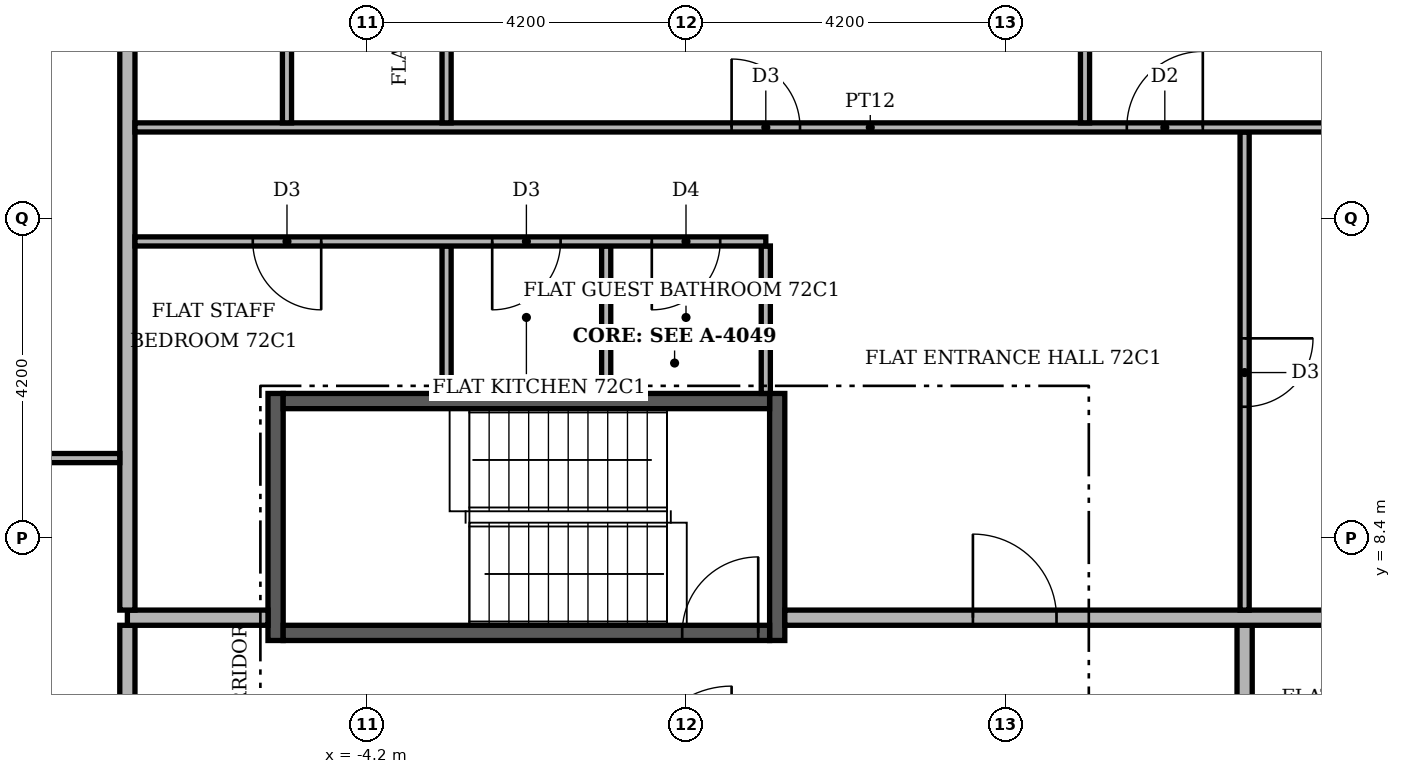
"""IFC4 building model, lengths in metres.
Left out: names, types, materials, properties, quantities, classifications, styles, units other than length and angle.
Written with IfcOpenShell. Run it as: python <this file> out.ifc"""

import sys

from ifc_helpers import new_model, si_unit, direction, frame, frame_2d, origin, place, context, subcontext, project, spatial, rectangle, extrude, element, fill, save


model = new_model("IFC4")
c1 = context("Model", 3, precision=1e-05, world=origin(), true_north=direction((0.0, 1.0)))
c2 = subcontext(c1, "Body", "Model", "MODEL_VIEW")
j1 = project(units=[si_unit("LENGTHUNIT", "METRE"), si_unit("PLANEANGLEUNIT", "RADIAN")], contexts=[c1])
p1 = place(None, origin())
s1 = spatial("IfcSite", under=j1, at=p1, CompositionType="ELEMENT")
p2 = place(p1, origin())
s2 = spatial("IfcBuilding", under=s1, at=p2, CompositionType="ELEMENT")
p3 = place(p2, frame((0.0, 0.0, 300.6)))
s3 = spatial("IfcBuildingStorey", under=s2, at=p3, CompositionType="ELEMENT", Elevation=300.6)
for number, where, z_axis, x_axis in (
    (1, (-5.4, 7.05, 0.0), (0.0, 0.0, 1.0), (0.0, 1.0, 0.0)),
    (2, (1.2, 7.05, 0.0), (0.0, 0.0, 1.0), (0.0, 1.0, 0.0)),
):
    element("IfcWall", number, at=place(p3, frame(where, z_axis=z_axis, x_axis=x_axis)), inside=s3, PredefinedType="SHEAR", context=c2, shape_type="SweptSolid", body=[
        extrude(rectangle(XDim=3.25, YDim=0.2, at=frame_2d((1.625, 0.0))), origin(), (0.0, 0.0, 1.0), 3.55),
    ])
p4 = place(p3, frame((-5.3, 7.15, 0.0), z_axis=(0.0, 0.0, 1.0), x_axis=(1.0, 0.0, 0.0)))
e3 = element("IfcWall", 3, at=p4, inside=s3, PredefinedType="SHEAR", context=c2, shape_type="SweptSolid", body=[
    extrude(rectangle(XDim=6.4, YDim=0.2, at=frame_2d((3.2, 0.0))), origin(), (0.0, 0.0, 1.0), 3.55),
])
p5 = place(p4, frame((5.25, 0.0, 0.0)))
e4 = element("IfcOpeningElement", 4, at=p5, cuts=e3, PredefinedType="OPENING", context=c2, shape_type="SweptSolid", body=[
    extrude(rectangle(XDim=1.0, YDim=2.1, at=frame_2d((0.5, 1.05))), frame((0.0, 0.11, 0.0), z_axis=(0.0, -1.0, 0.0), x_axis=(1.0, 0.0, 0.0)), (0.0, 0.0, 1.0), 0.22),
])
p6 = place(p3, frame((-5.3, 10.2, 0.0), z_axis=(0.0, 0.0, 1.0), x_axis=(1.0, 0.0, 0.0)))
e5 = element("IfcWall", 5, at=p6, inside=s3, PredefinedType="SHEAR", context=c2, shape_type="SweptSolid", body=[
    extrude(rectangle(XDim=6.4, YDim=0.2, at=frame_2d((3.2, 0.0))), origin(), (0.0, 0.0, 1.0), 3.55),
])
p7 = place(p3, frame((-7.35, -7.25, 0.0), z_axis=(0.0, 0.0, 1.0), x_axis=(0.0, 1.0, 0.0)))
e6 = element("IfcWall", 6, at=p7, inside=s3, PredefinedType="PARTITIONING", context=c2, shape_type="SweptSolid", body=[
    extrude(rectangle(XDim=14.5, YDim=0.2, at=frame_2d((7.25, 0.0))), origin(), (0.0, 0.0, 1.0), 3.55),
])
p8 = place(p7, frame((11.95, 0.0, 0.0)))
e7 = element("IfcOpeningElement", 7, at=p8, cuts=e6, PredefinedType="OPENING", context=c2, shape_type="SweptSolid", body=[
    extrude(rectangle(XDim=1.1, YDim=2.4, at=frame_2d((0.55, 1.2))), frame((0.0, 0.11, 0.0), z_axis=(0.0, -1.0, 0.0), x_axis=(1.0, 0.0, 0.0)), (0.0, 0.0, 1.0), 0.22),
])
p9 = place(p3, frame((7.35, -7.25, 0.0), z_axis=(0.0, 0.0, 1.0), x_axis=(0.0, 1.0, 0.0)))
e8 = element("IfcWall", 8, at=p9, inside=s3, PredefinedType="PARTITIONING", context=c2, shape_type="SweptSolid", body=[
    extrude(rectangle(XDim=14.5, YDim=0.2, at=frame_2d((7.25, 0.0))), origin(), (0.0, 0.0, 1.0), 3.55),
])
p10 = place(p9, frame((2.5, 0.0, 0.0)))
e9 = element("IfcOpeningElement", 9, at=p10, cuts=e8, PredefinedType="OPENING", context=c2, shape_type="SweptSolid", body=[
    extrude(rectangle(XDim=1.1, YDim=2.4, at=frame_2d((0.55, 1.2))), frame((0.0, 0.11, 0.0), z_axis=(0.0, -1.0, 0.0), x_axis=(1.0, 0.0, 0.0)), (0.0, 0.0, 1.0), 0.22),
])
p11 = place(p3, frame((-7.35, 7.35, 0.0), z_axis=(0.0, 0.0, 1.0), x_axis=(1.0, 0.0, 0.0)))
e10 = element("IfcWall", 10, at=p11, inside=s3, PredefinedType="PARTITIONING", context=c2, shape_type="SweptSolid", body=[
    extrude(rectangle(XDim=1.85, YDim=0.2, at=frame_2d((0.925, 0.0))), origin(), (0.0, 0.0, 1.0), 3.55),
])
p12 = place(p3, frame((1.3, 7.35, 0.0), z_axis=(0.0, 0.0, 1.0), x_axis=(1.0, 0.0, 0.0)))
e11 = element("IfcWall", 11, at=p12, inside=s3, PredefinedType="PARTITIONING", context=c2, shape_type="SweptSolid", body=[
    extrude(rectangle(XDim=17.2, YDim=0.2, at=frame_2d((8.6, 0.0))), origin(), (0.0, 0.0, 1.0), 3.55),
])
p13 = place(p12, frame((2.475, 0.0, 0.0)))
e12 = element("IfcOpeningElement", 12, at=p13, cuts=e11, PredefinedType="OPENING", context=c2, shape_type="SweptSolid", body=[
    extrude(rectangle(XDim=1.1, YDim=2.4, at=frame_2d((0.55, 1.2))), frame((0.0, 0.11, 0.0), z_axis=(0.0, -1.0, 0.0), x_axis=(1.0, 0.0, 0.0)), (0.0, 0.0, 1.0), 0.22),
])
p14 = place(p3, frame((-7.35, 7.45, 0.0), z_axis=(0.0, 0.0, 1.0), x_axis=(0.0, 1.0, 0.0)))
e13 = element("IfcWall", 13, at=p14, inside=s3, PredefinedType="PARTITIONING", context=c2, shape_type="SweptSolid", body=[
    extrude(rectangle(XDim=11.05, YDim=0.2, at=frame_2d((5.525, 0.0))), origin(), (0.0, 0.0, 1.0), 3.55),
])
p15 = place(p3, frame((7.35, 7.45, 0.0), z_axis=(0.0, 0.0, 1.0), x_axis=(0.0, 1.0, 0.0)))
e14 = element("IfcWall", 14, at=p15, inside=s3, PredefinedType="PARTITIONING", context=c2, shape_type="SweptSolid", body=[
    extrude(rectangle(XDim=6.29, YDim=0.12, at=frame_2d((3.145, 0.0))), origin(), (0.0, 0.0, 1.0), 3.55),
])
p16 = place(p15, frame((2.675, 0.0, 0.0)))
e15 = element("IfcOpeningElement", 15, at=p16, cuts=e14, PredefinedType="OPENING", context=c2, shape_type="SweptSolid", body=[
    extrude(rectangle(XDim=0.9, YDim=2.1, at=frame_2d((0.45, 1.05))), frame((0.0, 0.07, 0.0), z_axis=(0.0, -1.0, 0.0), x_axis=(1.0, 0.0, 0.0)), (0.0, 0.0, 1.0), 0.14),
])
p17 = place(p3, frame((-13.2, 9.45, 0.0), z_axis=(0.0, 0.0, 1.0), x_axis=(1.0, 0.0, 0.0)))
e16 = element("IfcWall", 16, at=p17, inside=s3, PredefinedType="PARTITIONING", context=c2, shape_type="SweptSolid", body=[
    extrude(rectangle(XDim=5.75, YDim=0.12, at=frame_2d((2.875, 0.0))), origin(), (0.0, 0.0, 1.0), 3.55),
])
p18 = place(p17, frame((2.475, 0.0, 0.0)))
e17 = element("IfcOpeningElement", 17, at=p18, cuts=e16, PredefinedType="OPENING", context=c2, shape_type="SweptSolid", body=[
    extrude(rectangle(XDim=0.9, YDim=2.1, at=frame_2d((0.45, 1.05))), frame((0.0, 0.07, 0.0), z_axis=(0.0, -1.0, 0.0), x_axis=(1.0, 0.0, 0.0)), (0.0, 0.0, 1.0), 0.14),
])
for number, where, z_axis, x_axis in (
    (18, (-3.15, 10.3, 0.0), (0.0, 0.0, 1.0), (0.0, 1.0, 0.0)),
    (19, (-1.05, 10.3, 0.0), (0.0, 0.0, 1.0), (0.0, 1.0, 0.0)),
    (20, (1.05, 10.3, 0.0), (0.0, 0.0, 1.0), (0.0, 1.0, 0.0)),
):
    element("IfcWall", number, at=place(p3, frame(where, z_axis=z_axis, x_axis=x_axis)), inside=s3, PredefinedType="PARTITIONING", context=c2, shape_type="SweptSolid", body=[
        extrude(rectangle(XDim=1.94, YDim=0.12, at=frame_2d((0.97, 0.0))), origin(), (0.0, 0.0, 1.0), 3.55),
    ])
p19 = place(p3, frame((-7.25, 12.3, 0.0), z_axis=(0.0, 0.0, 1.0), x_axis=(1.0, 0.0, 0.0)))
e21 = element("IfcWall", 21, at=p19, inside=s3, PredefinedType="PARTITIONING", context=c2, shape_type="SweptSolid", body=[
    extrude(rectangle(XDim=8.3, YDim=0.12, at=frame_2d((4.15, 0.0))), origin(), (0.0, 0.0, 1.0), 3.55),
])
p20 = place(p19, frame((6.8, 0.0, 0.0)))
e22 = element("IfcOpeningElement", 22, at=p20, cuts=e21, PredefinedType="OPENING", context=c2, shape_type="SweptSolid", body=[
    extrude(rectangle(XDim=0.9, YDim=2.1, at=frame_2d((0.45, 1.05))), frame((0.0, 0.07, 0.0), z_axis=(0.0, -1.0, 0.0), x_axis=(1.0, 0.0, 0.0)), (0.0, 0.0, 1.0), 0.14),
])
p21 = place(p19, frame((4.7, 0.0, 0.0)))
e23 = element("IfcOpeningElement", 23, at=p21, cuts=e21, PredefinedType="OPENING", context=c2, shape_type="SweptSolid", body=[
    extrude(rectangle(XDim=0.9, YDim=2.1, at=frame_2d((0.45, 1.05))), frame((0.0, 0.07, 0.0), z_axis=(0.0, -1.0, 0.0), x_axis=(1.0, 0.0, 0.0)), (0.0, 0.0, 1.0), 0.14),
])
p22 = place(p19, frame((1.55, 0.0, 0.0)))
e24 = element("IfcOpeningElement", 24, at=p22, cuts=e21, PredefinedType="OPENING", context=c2, shape_type="SweptSolid", body=[
    extrude(rectangle(XDim=0.9, YDim=2.1, at=frame_2d((0.45, 1.05))), frame((0.0, 0.07, 0.0), z_axis=(0.0, -1.0, 0.0), x_axis=(1.0, 0.0, 0.0)), (0.0, 0.0, 1.0), 0.14),
])
p23 = place(p3, frame((-7.25, 13.8, 0.0), z_axis=(0.0, 0.0, 1.0), x_axis=(1.0, 0.0, 0.0)))
e25 = element("IfcWall", 25, at=p23, inside=s3, PredefinedType="PARTITIONING", context=c2, shape_type="SweptSolid", body=[
    extrude(rectangle(XDim=19.349, YDim=0.12, at=frame_2d((9.675, 0.0))), origin(), (0.0, 0.0, 1.0), 3.55),
])
p24 = place(p23, frame((13.05, 0.0, 0.0)))
e26 = element("IfcOpeningElement", 26, at=p24, cuts=e25, PredefinedType="OPENING", context=c2, shape_type="SweptSolid", body=[
    extrude(rectangle(XDim=1.0, YDim=2.1, at=frame_2d((0.5, 1.05))), frame((0.0, 0.07, 0.0), z_axis=(0.0, -1.0, 0.0), x_axis=(1.0, 0.0, 0.0)), (0.0, 0.0, 1.0), 0.14),
])
p25 = place(p23, frame((7.85, 0.0, 0.0)))
e27 = element("IfcOpeningElement", 27, at=p25, cuts=e25, PredefinedType="OPENING", context=c2, shape_type="SweptSolid", body=[
    extrude(rectangle(XDim=0.9, YDim=2.1, at=frame_2d((0.45, 1.05))), frame((0.0, 0.07, 0.0), z_axis=(0.0, -1.0, 0.0), x_axis=(1.0, 0.0, 0.0)), (0.0, 0.0, 1.0), 0.14),
])
p26 = place(p3, frame((-5.25, 13.86, 0.0), z_axis=(0.0, 0.0, 1.0), x_axis=(0.0, 1.0, 0.0)))
e28 = element("IfcWall", 28, at=p26, inside=s3, PredefinedType="PARTITIONING", context=c2, shape_type="SweptSolid", body=[
    extrude(rectangle(XDim=4.64, YDim=0.12, at=frame_2d((2.32, 0.0))), origin(), (0.0, 0.0, 1.0), 3.55),
])
p27 = place(p26, frame((1.99, 0.0, 0.0)))
e29 = element("IfcOpeningElement", 29, at=p27, cuts=e28, PredefinedType="OPENING", context=c2, shape_type="SweptSolid", body=[
    extrude(rectangle(XDim=0.9, YDim=2.1, at=frame_2d((0.45, 1.05))), frame((0.0, 0.07, 0.0), z_axis=(0.0, -1.0, 0.0), x_axis=(1.0, 0.0, 0.0)), (0.0, 0.0, 1.0), 0.14),
])
p28 = place(p3, frame((-3.15, 13.86, 0.0), z_axis=(0.0, 0.0, 1.0), x_axis=(0.0, 1.0, 0.0)))
e30 = element("IfcWall", 30, at=p28, inside=s3, PredefinedType="PARTITIONING", context=c2, shape_type="SweptSolid", body=[
    extrude(rectangle(XDim=4.64, YDim=0.12, at=frame_2d((2.32, 0.0))), origin(), (0.0, 0.0, 1.0), 3.55),
])
p29 = place(p28, frame((1.99, 0.0, 0.0)))
e31 = element("IfcOpeningElement", 31, at=p29, cuts=e30, PredefinedType="OPENING", context=c2, shape_type="SweptSolid", body=[
    extrude(rectangle(XDim=0.9, YDim=2.1, at=frame_2d((0.45, 1.05))), frame((0.0, 0.07, 0.0), z_axis=(0.0, -1.0, 0.0), x_axis=(1.0, 0.0, 0.0)), (0.0, 0.0, 1.0), 0.14),
])
p30 = place(p3, frame((5.25, 13.86, 0.0), z_axis=(0.0, 0.0, 1.0), x_axis=(0.0, 1.0, 0.0)))
e32 = element("IfcWall", 32, at=p30, inside=s3, PredefinedType="PARTITIONING", context=c2, shape_type="SweptSolid", body=[
    extrude(rectangle(XDim=4.64, YDim=0.12, at=frame_2d((2.32, 0.0))), origin(), (0.0, 0.0, 1.0), 3.55),
])
p31 = place(p5, origin())
e33 = element("IfcDoor", 33, at=p31, inside=s3, OperationType="SINGLE_SWING_RIGHT", PredefinedType="DOOR", context=c2, shape_type="SweptSolid", body=[
    extrude(rectangle(XDim=1.0, YDim=2.1, at=frame_2d((0.5, 1.05))), frame((0.0, 0.025, 0.0), z_axis=(0.0, -1.0, 0.0), x_axis=(1.0, 0.0, 0.0)), (0.0, 0.0, 1.0), 0.05),
])
fill(e4, e33)
p32 = place(p13, origin())
e34 = element("IfcDoor", 34, at=p32, inside=s3, OperationType="SINGLE_SWING_LEFT", PredefinedType="DOOR", context=c2, shape_type="SweptSolid", body=[
    extrude(rectangle(XDim=1.1, YDim=2.4, at=frame_2d((0.55, 1.2))), frame((0.0, 0.025, 0.0), z_axis=(0.0, -1.0, 0.0), x_axis=(1.0, 0.0, 0.0)), (0.0, 0.0, 1.0), 0.05),
])
fill(e12, e34)
p33 = place(p16, frame((0.9, 0.0, 0.0), z_axis=(0.0, 0.0, 1.0), x_axis=(-1.0, 0.0, 0.0)))
e35 = element("IfcDoor", 35, at=p33, inside=s3, OperationType="SINGLE_SWING_RIGHT", PredefinedType="DOOR", context=c2, shape_type="SweptSolid", body=[
    extrude(rectangle(XDim=0.9, YDim=2.1, at=frame_2d((0.45, 1.05))), frame((0.0, 0.025, 0.0), z_axis=(0.0, -1.0, 0.0), x_axis=(1.0, 0.0, 0.0)), (0.0, 0.0, 1.0), 0.05),
])
fill(e15, e35)
p34 = place(p20, frame((0.9, 0.0, 0.0), z_axis=(0.0, 0.0, 1.0), x_axis=(-1.0, 0.0, 0.0)))
e36 = element("IfcDoor", 36, at=p34, inside=s3, OperationType="SINGLE_SWING_LEFT", PredefinedType="DOOR", context=c2, shape_type="SweptSolid", body=[
    extrude(rectangle(XDim=0.9, YDim=2.1, at=frame_2d((0.45, 1.05))), frame((0.0, 0.025, 0.0), z_axis=(0.0, -1.0, 0.0), x_axis=(1.0, 0.0, 0.0)), (0.0, 0.0, 1.0), 0.05),
])
fill(e22, e36)
p35 = place(p21, frame((0.9, 0.0, 0.0), z_axis=(0.0, 0.0, 1.0), x_axis=(-1.0, 0.0, 0.0)))
e37 = element("IfcDoor", 37, at=p35, inside=s3, OperationType="SINGLE_SWING_LEFT", PredefinedType="DOOR", context=c2, shape_type="SweptSolid", body=[
    extrude(rectangle(XDim=0.9, YDim=2.1, at=frame_2d((0.45, 1.05))), frame((0.0, 0.025, 0.0), z_axis=(0.0, -1.0, 0.0), x_axis=(1.0, 0.0, 0.0)), (0.0, 0.0, 1.0), 0.05),
])
fill(e23, e37)
p36 = place(p22, frame((0.9, 0.0, 0.0), z_axis=(0.0, 0.0, 1.0), x_axis=(-1.0, 0.0, 0.0)))
e38 = element("IfcDoor", 38, at=p36, inside=s3, OperationType="SINGLE_SWING_RIGHT", PredefinedType="DOOR", context=c2, shape_type="SweptSolid", body=[
    extrude(rectangle(XDim=0.9, YDim=2.1, at=frame_2d((0.45, 1.05))), frame((0.0, 0.025, 0.0), z_axis=(0.0, -1.0, 0.0), x_axis=(1.0, 0.0, 0.0)), (0.0, 0.0, 1.0), 0.05),
])
fill(e24, e38)
p37 = place(p24, origin())
e39 = element("IfcDoor", 39, at=p37, inside=s3, OperationType="SINGLE_SWING_RIGHT", PredefinedType="DOOR", context=c2, shape_type="SweptSolid", body=[
    extrude(rectangle(XDim=1.0, YDim=2.1, at=frame_2d((0.5, 1.05))), frame((0.0, 0.025, 0.0), z_axis=(0.0, -1.0, 0.0), x_axis=(1.0, 0.0, 0.0)), (0.0, 0.0, 1.0), 0.05),
])
fill(e26, e39)
p38 = place(p25, origin())
e40 = element("IfcDoor", 40, at=p38, inside=s3, OperationType="SINGLE_SWING_LEFT", PredefinedType="DOOR", context=c2, shape_type="SweptSolid", body=[
    extrude(rectangle(XDim=0.9, YDim=2.1, at=frame_2d((0.45, 1.05))), frame((0.0, 0.025, 0.0), z_axis=(0.0, -1.0, 0.0), x_axis=(1.0, 0.0, 0.0)), (0.0, 0.0, 1.0), 0.05),
])
fill(e27, e40)
save(model, sys.argv[1])
